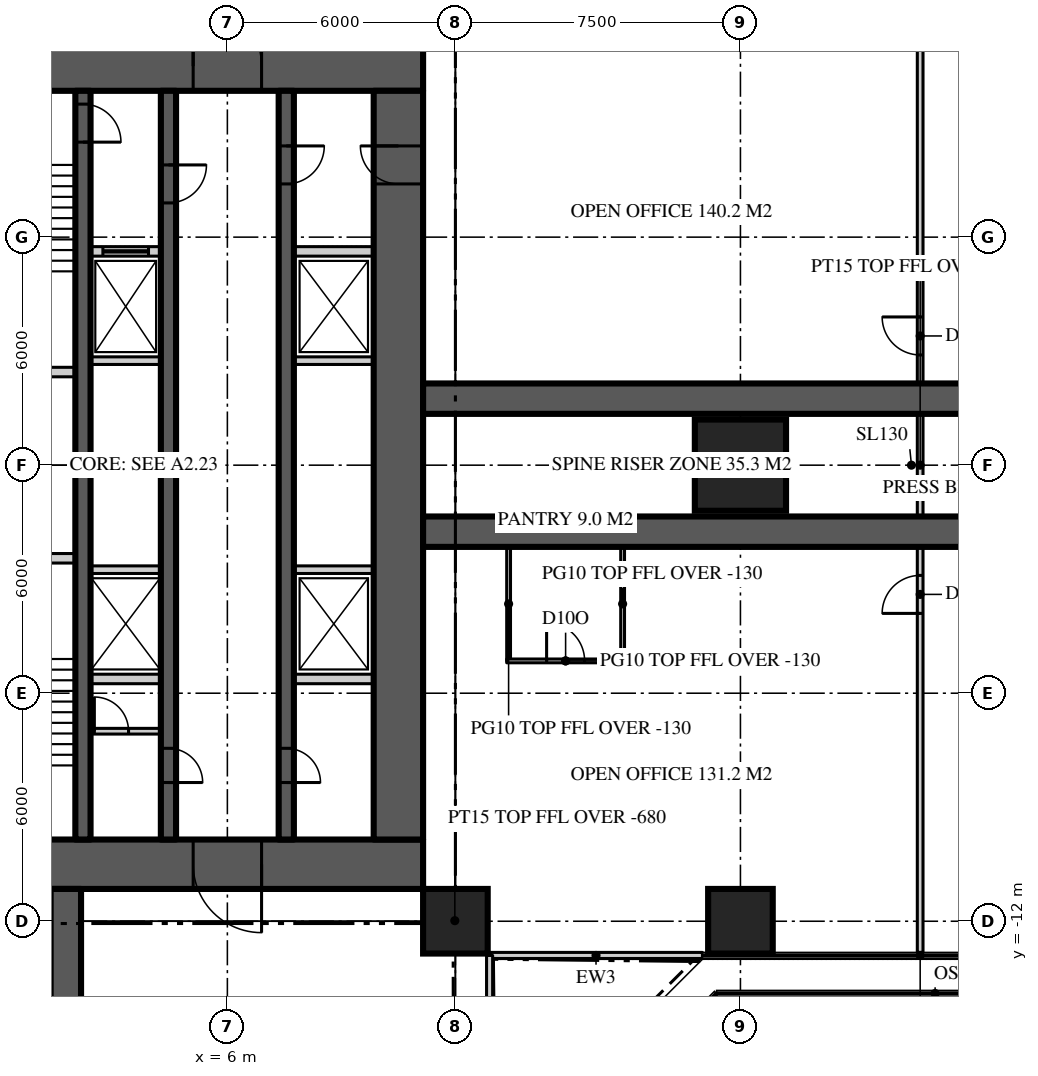
"""IFC4 building model, lengths in metres.
Left out: names, types, materials, properties, quantities, classifications, styles, units other than length and angle.
Written with IfcOpenShell. Run it as: python <this file> out.ifc"""

import sys

from ifc_helpers import new_model, si_unit, direction, frame, frame_2d, origin, origin_2d, place, context, subcontext, project, spatial, rectangle, extrude, element, fill, save


model = new_model("IFC4")
c1 = context("Model", 3, precision=1e-05, world=origin(), true_north=direction((0.0, 1.0)))
c2 = subcontext(c1, "Body", "Model", "MODEL_VIEW")
j1 = project(units=[si_unit("LENGTHUNIT", "METRE"), si_unit("PLANEANGLEUNIT", "RADIAN")], contexts=[c1])
p1 = place(None, origin())
s1 = spatial("IfcSite", under=j1, at=p1, CompositionType="ELEMENT")
p2 = place(p1, origin())
s2 = spatial("IfcBuilding", under=s1, at=p2, CompositionType="ELEMENT")
p3 = place(p2, frame((0.0, 0.0, 174.9)))
s3 = spatial("IfcBuildingStorey", under=s2, at=p3, CompositionType="ELEMENT", Elevation=174.9)
p4 = place(p3, frame((-11.15, 10.5, 0.0), z_axis=(0.0, 0.0, 1.0), x_axis=(1.0, 0.0, 0.0)))
e1 = element("IfcWall", 1, at=p4, inside=s3, PredefinedType="SHEAR", context=c2, shape_type="SweptSolid", body=[
    extrude(rectangle(XDim=22.3, YDim=1.3, at=frame_2d((11.15, 0.0))), origin(), (0.0, 0.0, 1.0), 3.9),
])
p5 = place(p4, frame((4.25, 0.0, 0.0)))
e2 = element("IfcOpeningElement", 2, at=p5, cuts=e1, PredefinedType="OPENING", context=c2, shape_type="SweptSolid", body=[
    extrude(rectangle(XDim=1.8, YDim=2.2, at=frame_2d((0.9, 1.1))), frame((0.0, 0.66, 0.0), z_axis=(0.0, -1.0, 0.0), x_axis=(1.0, 0.0, 0.0)), (0.0, 0.0, 1.0), 1.32),
])
p6 = place(p4, frame((16.25, 0.0, 0.0)))
e3 = element("IfcOpeningElement", 3, at=p6, cuts=e1, PredefinedType="OPENING", context=c2, shape_type="SweptSolid", body=[
    extrude(rectangle(XDim=1.8, YDim=2.2, at=frame_2d((0.9, 1.1))), frame((0.0, 0.66, 0.0), z_axis=(0.0, -1.0, 0.0), x_axis=(1.0, 0.0, 0.0)), (0.0, 0.0, 1.0), 1.32),
])
p7 = place(p3, frame((11.15, -10.5, 0.0), z_axis=(0.0, 0.0, 1.0), x_axis=(-1.0, 0.0, 0.0)))
e4 = element("IfcWall", 4, at=p7, inside=s3, PredefinedType="SHEAR", context=c2, shape_type="SweptSolid", body=[
    extrude(rectangle(XDim=22.3, YDim=1.3, at=frame_2d((11.15, 0.0))), origin(), (0.0, 0.0, 1.0), 3.9),
])
p8 = place(p7, frame((16.25, 0.0, 0.0)))
e5 = element("IfcOpeningElement", 5, at=p8, cuts=e4, PredefinedType="OPENING", context=c2, shape_type="SweptSolid", body=[
    extrude(rectangle(XDim=1.8, YDim=2.2, at=frame_2d((0.9, 1.1))), frame((0.0, 0.66, 0.0), z_axis=(0.0, -1.0, 0.0), x_axis=(1.0, 0.0, 0.0)), (0.0, 0.0, 1.0), 1.32),
])
p9 = place(p7, frame((4.25, 0.0, 0.0)))
e6 = element("IfcOpeningElement", 6, at=p9, cuts=e4, PredefinedType="OPENING", context=c2, shape_type="SweptSolid", body=[
    extrude(rectangle(XDim=1.8, YDim=2.2, at=frame_2d((0.9, 1.1))), frame((0.0, 0.66, 0.0), z_axis=(0.0, -1.0, 0.0), x_axis=(1.0, 0.0, 0.0)), (0.0, 0.0, 1.0), 1.32),
])
p10 = place(p3, frame((10.5, -9.85, 0.0), z_axis=(0.0, 0.0, 1.0), x_axis=(0.0, 1.0, 0.0)))
e7 = element("IfcWall", 7, at=p10, inside=s3, PredefinedType="SHEAR", context=c2, shape_type="SweptSolid", body=[
    extrude(rectangle(XDim=19.7, YDim=1.3, at=frame_2d((9.85, 0.0))), origin(), (0.0, 0.0, 1.0), 3.9),
])
p11 = place(p10, frame((17.25, 0.0, 0.0)))
e8 = element("IfcOpeningElement", 8, at=p11, cuts=e7, PredefinedType="OPENING", context=c2, shape_type="SweptSolid", body=[
    extrude(rectangle(XDim=1.0, YDim=2.2, at=frame_2d((0.5, 1.1))), frame((0.0, 0.66, 0.0), z_axis=(0.0, -1.0, 0.0), x_axis=(1.0, 0.0, 0.0)), (0.0, 0.0, 1.0), 1.32),
])
for number, where, z_axis, x_axis in (
    (9, (11.15, -1.75, 0.0), (0.0, 0.0, 1.0), (1.0, 0.0, 0.0)),
    (10, (11.15, 1.75, 0.0), (0.0, 0.0, 1.0), (1.0, 0.0, 0.0)),
    (11, (1.75, -11.15, 0.0), (0.0, 0.0, 1.0), (0.0, -1.0, 0.0)),
):
    element("IfcWall", number, at=place(p3, frame(where, z_axis=z_axis, x_axis=x_axis)), inside=s3, PredefinedType="SHEAR", context=c2, shape_type="SweptSolid", body=[
        extrude(rectangle(XDim=15.25, YDim=0.8, at=frame_2d((7.625, 0.0))), origin(), (0.0, 0.0, 1.0), 3.9),
    ])
for number, where, z_axis, x_axis in (
    (12, (12.0, -12.0, 0.0), (0.0, 0.0, 1.0), (1.0, 0.0, 0.0)),
    (13, (19.5, -12.0, 0.0), (0.0, 0.0, 1.0), (1.0, 0.0, 0.0)),
):
    element("IfcColumn", number, at=place(p3, frame(where, z_axis=z_axis, x_axis=x_axis)), inside=s3, PredefinedType="COLUMN", context=c2, shape_type="SweptSolid", body=[
        extrude(rectangle(XDim=1.7, YDim=1.7, at=origin_2d()), origin(), (0.0, 0.0, 1.0), 3.9),
    ])
p12 = place(p3, frame((19.5, 0.0, 0.0), z_axis=(0.0, 0.0, 1.0), x_axis=(1.0, 0.0, 0.0)))
e14 = element("IfcColumn", 14, at=p12, inside=s3, PredefinedType="COLUMN", context=c2, shape_type="SweptSolid", body=[
    extrude(rectangle(XDim=2.4, YDim=2.4, at=origin_2d()), origin(), (0.0, 0.0, 1.0), 3.9),
])
p13 = place(p3, frame((12.9, -12.9, 0.0), z_axis=(0.0, 0.0, 1.0), x_axis=(1.0, 0.0, 0.0)))
e15 = element("IfcWall", 15, at=p13, inside=s3, PredefinedType="SOLIDWALL", context=c2, shape_type="SweptSolid", body=[
    extrude(rectangle(XDim=5.6, YDim=0.16, at=frame_2d((2.8, 0.0))), origin(), (0.0, 0.0, 1.0), 3.77),
])
p14 = place(p3, frame((12.9, -18.5, 0.0), z_axis=(0.0, 0.0, 1.0), x_axis=(0.0, 1.0, 0.0)))
e16 = element("IfcWall", 16, at=p14, inside=s3, PredefinedType="SOLIDWALL", context=c2, shape_type="SweptSolid", body=[
    extrude(rectangle(XDim=5.6, YDim=0.16, at=frame_2d((2.8, 0.0))), origin(), (0.0, 0.0, 1.0), 3.77),
])
p15 = place(p14, frame((2.3, 0.0, 0.0)))
e17 = element("IfcOpeningElement", 17, at=p15, cuts=e16, PredefinedType="OPENING", context=c2, shape_type="SweptSolid", body=[
    extrude(rectangle(XDim=1.0, YDim=2.2, at=frame_2d((0.5, 1.1))), frame((0.0, 0.09, 0.0), z_axis=(0.0, -1.0, 0.0), x_axis=(1.0, 0.0, 0.0)), (0.0, 0.0, 1.0), 0.18),
])
p16 = place(p3, frame((7.55, 9.85, 0.0), z_axis=(0.0, 0.0, 1.0), x_axis=(0.0, -1.0, 0.0)))
e18 = element("IfcWall", 18, at=p16, inside=s3, PredefinedType="SHEAR", context=c2, shape_type="SweptSolid", body=[
    extrude(rectangle(XDim=19.7, YDim=0.4, at=frame_2d((9.85, 0.0))), origin(), (0.0, 0.0, 1.0), 3.9),
])
p17 = place(p16, frame((1.45, 0.0, 0.0)))
e19 = element("IfcOpeningElement", 19, at=p17, cuts=e18, PredefinedType="OPENING", context=c2, shape_type="SweptSolid", body=[
    extrude(rectangle(XDim=1.0, YDim=2.2, at=frame_2d((0.5, 1.1))), frame((0.0, 0.21, 0.0), z_axis=(0.0, -1.0, 0.0), x_axis=(1.0, 0.0, 0.0)), (0.0, 0.0, 1.0), 0.42),
])
p18 = place(p16, frame((17.3, 0.0, 0.0)))
e20 = element("IfcOpeningElement", 20, at=p18, cuts=e18, PredefinedType="OPENING", context=c2, shape_type="SweptSolid", body=[
    extrude(rectangle(XDim=0.9, YDim=2.1, at=frame_2d((0.45, 1.05))), frame((0.0, 0.21, 0.0), z_axis=(0.0, -1.0, 0.0), x_axis=(1.0, 0.0, 0.0)), (0.0, 0.0, 1.0), 0.42),
])
p19 = place(p3, frame((4.45, 9.85, 0.0), z_axis=(0.0, 0.0, 1.0), x_axis=(0.0, -1.0, 0.0)))
e21 = element("IfcWall", 21, at=p19, inside=s3, PredefinedType="SHEAR", context=c2, shape_type="SweptSolid", body=[
    extrude(rectangle(XDim=19.7, YDim=0.4, at=frame_2d((9.85, 0.0))), origin(), (0.0, 0.0, 1.0), 3.9),
])
p20 = place(p19, frame((1.95, 0.0, 0.0)))
e22 = element("IfcOpeningElement", 22, at=p20, cuts=e21, PredefinedType="OPENING", context=c2, shape_type="SweptSolid", body=[
    extrude(rectangle(XDim=1.0, YDim=2.2, at=frame_2d((0.5, 1.1))), frame((0.0, 0.21, 0.0), z_axis=(0.0, -1.0, 0.0), x_axis=(1.0, 0.0, 0.0)), (0.0, 0.0, 1.0), 0.42),
])
p21 = place(p19, frame((17.3, 0.0, 0.0)))
e23 = element("IfcOpeningElement", 23, at=p21, cuts=e21, PredefinedType="OPENING", context=c2, shape_type="SweptSolid", body=[
    extrude(rectangle(XDim=0.9, YDim=2.1, at=frame_2d((0.45, 1.05))), frame((0.0, 0.21, 0.0), z_axis=(0.0, -1.0, 0.0), x_axis=(1.0, 0.0, 0.0)), (0.0, 0.0, 1.0), 0.42),
])
p22 = place(p3, frame((2.2, 9.85, 0.0), z_axis=(0.0, 0.0, 1.0), x_axis=(0.0, -1.0, 0.0)))
e24 = element("IfcWall", 24, at=p22, inside=s3, PredefinedType="SHEAR", context=c2, shape_type="SweptSolid", body=[
    extrude(rectangle(XDim=19.7, YDim=0.4, at=frame_2d((9.85, 0.0))), origin(), (0.0, 0.0, 1.0), 3.9),
])
p23 = place(p22, frame((0.35, 0.0, 0.0)))
e25 = element("IfcOpeningElement", 25, at=p23, cuts=e24, PredefinedType="OPENING", context=c2, shape_type="SweptSolid", body=[
    extrude(rectangle(XDim=1.0, YDim=2.2, at=frame_2d((0.5, 1.1))), frame((0.0, 0.21, 0.0), z_axis=(0.0, -1.0, 0.0), x_axis=(1.0, 0.0, 0.0)), (0.0, 0.0, 1.0), 0.42),
])
p24 = place(p3, frame((2.4, 5.625, 0.0), z_axis=(0.0, 0.0, 1.0), x_axis=(1.0, 0.0, 0.0)))
e26 = element("IfcWall", 26, at=p24, inside=s3, PredefinedType="SOLIDWALL", context=c2, shape_type="SweptSolid", body=[
    extrude(rectangle(XDim=1.85, YDim=0.25, at=frame_2d((0.925, 0.0))), origin(), (0.0, 0.0, 1.0), 3.7),
])
p25 = place(p24, frame((0.325, 0.0, 0.0)))
e27 = element("IfcOpeningElement", 27, at=p25, cuts=e26, PredefinedType="OPENING", context=c2, shape_type="SweptSolid", body=[
    extrude(rectangle(XDim=1.2, YDim=2.2, at=frame_2d((0.6, 1.1))), frame((0.0, 0.135, 0.0), z_axis=(0.0, -1.0, 0.0), x_axis=(1.0, 0.0, 0.0)), (0.0, 0.0, 1.0), 0.27),
])
p26 = place(p3, frame((7.75, 5.625, 0.0), z_axis=(0.0, 0.0, 1.0), x_axis=(1.0, 0.0, 0.0)))
e28 = element("IfcWall", 28, at=p26, inside=s3, PredefinedType="SOLIDWALL", context=c2, shape_type="SweptSolid", body=[
    extrude(rectangle(XDim=2.1, YDim=0.25, at=frame_2d((1.05, 0.0))), origin(), (0.0, 0.0, 1.0), 3.7),
])
p27 = place(p3, frame((2.4, -5.625, 0.0), z_axis=(0.0, 0.0, 1.0), x_axis=(1.0, 0.0, 0.0)))
e29 = element("IfcWall", 29, at=p27, inside=s3, PredefinedType="SOLIDWALL", context=c2, shape_type="SweptSolid", body=[
    extrude(rectangle(XDim=1.85, YDim=0.25, at=frame_2d((0.925, 0.0))), origin(), (0.0, 0.0, 1.0), 3.7),
])
p28 = place(p3, frame((7.75, -5.625, 0.0), z_axis=(0.0, 0.0, 1.0), x_axis=(1.0, 0.0, 0.0)))
e30 = element("IfcWall", 30, at=p28, inside=s3, PredefinedType="SOLIDWALL", context=c2, shape_type="SweptSolid", body=[
    extrude(rectangle(XDim=2.1, YDim=0.25, at=frame_2d((1.05, 0.0))), origin(), (0.0, 0.0, 1.0), 3.7),
])
for number, where, z_axis, x_axis in (
    (31, (-2.0, -2.45, 0.0), (0.0, 0.0, 1.0), (1.0, 0.0, 0.0)),
    (32, (-2.0, 2.45, 0.0), (0.0, 0.0, 1.0), (1.0, 0.0, 0.0)),
):
    element("IfcWall", number, at=place(p3, frame(where, z_axis=z_axis, x_axis=x_axis)), inside=s3, PredefinedType="SOLIDWALL", context=c2, shape_type="SweptSolid", body=[
        extrude(rectangle(XDim=4.0, YDim=0.25, at=frame_2d((2.0, 0.0))), origin(), (0.0, 0.0, 1.0), 3.7),
    ])
p29 = place(p3, frame((2.4, -2.75, 0.0), z_axis=(0.0, 0.0, 1.0), x_axis=(1.0, 0.0, 0.0)))
e33 = element("IfcWall", 33, at=p29, inside=s3, PredefinedType="SOLIDWALL", context=c2, shape_type="SweptSolid", body=[
    extrude(rectangle(XDim=1.85, YDim=0.2, at=frame_2d((0.925, 0.0))), origin(), (0.0, 0.0, 1.0), 3.7),
])
p30 = place(p3, frame((7.75, -2.75, 0.0), z_axis=(0.0, 0.0, 1.0), x_axis=(1.0, 0.0, 0.0)))
e34 = element("IfcWall", 34, at=p30, inside=s3, PredefinedType="SOLIDWALL", context=c2, shape_type="SweptSolid", body=[
    extrude(rectangle(XDim=2.1, YDim=0.2, at=frame_2d((1.05, 0.0))), origin(), (0.0, 0.0, 1.0), 3.7),
])
p31 = place(p3, frame((2.4, 2.75, 0.0), z_axis=(0.0, 0.0, 1.0), x_axis=(1.0, 0.0, 0.0)))
e35 = element("IfcWall", 35, at=p31, inside=s3, PredefinedType="SOLIDWALL", context=c2, shape_type="SweptSolid", body=[
    extrude(rectangle(XDim=1.85, YDim=0.2, at=frame_2d((0.925, 0.0))), origin(), (0.0, 0.0, 1.0), 3.7),
])
p32 = place(p3, frame((7.75, 2.75, 0.0), z_axis=(0.0, 0.0, 1.0), x_axis=(1.0, 0.0, 0.0)))
e36 = element("IfcWall", 36, at=p32, inside=s3, PredefinedType="SOLIDWALL", context=c2, shape_type="SweptSolid", body=[
    extrude(rectangle(XDim=2.1, YDim=0.2, at=frame_2d((1.05, 0.0))), origin(), (0.0, 0.0, 1.0), 3.7),
])
p33 = place(p3, frame((24.229, -12.82, 0.0), z_axis=(0.0, 0.0, 1.0), x_axis=(0.0, 1.0, 0.0)))
e37 = element("IfcWall", 37, at=p33, inside=s3, PredefinedType="PARTITIONING", context=c2, shape_type="SweptSolid", body=[
    extrude(rectangle(XDim=25.64, YDim=0.15, at=frame_2d((12.82, 0.0))), origin(), (0.0, 0.0, 1.0), 3.77),
])
p34 = place(p33, frame((15.72, 0.0, 0.0)))
e38 = element("IfcOpeningElement", 38, at=p34, cuts=e37, PredefinedType="OPENING", context=c2, shape_type="SweptSolid", body=[
    extrude(rectangle(XDim=1.0, YDim=2.2, at=frame_2d((0.5, 1.1))), frame((0.0, 0.085, 0.0), z_axis=(0.0, -1.0, 0.0), x_axis=(1.0, 0.0, 0.0)), (0.0, 0.0, 1.0), 0.17),
])
p35 = place(p33, frame((8.92, 0.0, 0.0)))
e39 = element("IfcOpeningElement", 39, at=p35, cuts=e37, PredefinedType="OPENING", context=c2, shape_type="SweptSolid", body=[
    extrude(rectangle(XDim=1.0, YDim=2.2, at=frame_2d((0.5, 1.1))), frame((0.0, 0.085, 0.0), z_axis=(0.0, -1.0, 0.0), x_axis=(1.0, 0.0, 0.0)), (0.0, 0.0, 1.0), 0.17),
])
for number, where, z_axis, x_axis in (
    (40, (13.4, -2.15, 0.0), (0.0, 0.0, 1.0), (0.0, -1.0, 0.0)),
    (41, (16.4, -2.15, 0.0), (0.0, 0.0, 1.0), (0.0, -1.0, 0.0)),
):
    element("IfcWall", number, at=place(p3, frame(where, z_axis=z_axis, x_axis=x_axis)), inside=s3, PredefinedType="PARTITIONING", context=c2, shape_type="SweptSolid", body=[
        extrude(rectangle(XDim=3.0, YDim=0.1, at=frame_2d((1.5, 0.0))), origin(), (0.0, 0.0, 1.0), 3.77),
    ])
p36 = place(p3, frame((13.35, -5.15, 0.0), z_axis=(0.0, 0.0, 1.0), x_axis=(1.0, 0.0, 0.0)))
e42 = element("IfcWall", 42, at=p36, inside=s3, PredefinedType="PARTITIONING", context=c2, shape_type="SweptSolid", body=[
    extrude(rectangle(XDim=3.1, YDim=0.1, at=frame_2d((1.55, 0.0))), origin(), (0.0, 0.0, 1.0), 3.77),
])
p37 = place(p36, frame((1.05, 0.0, 0.0)))
e43 = element("IfcOpeningElement", 43, at=p37, cuts=e42, PredefinedType="OPENING", context=c2, shape_type="SweptSolid", body=[
    extrude(rectangle(XDim=1.0, YDim=2.2, at=frame_2d((0.5, 1.1))), frame((0.0, 0.06, 0.0), z_axis=(0.0, -1.0, 0.0), x_axis=(1.0, 0.0, 0.0)), (0.0, 0.0, 1.0), 0.12),
])
p38 = place(p3, frame((11.15, -11.15, 0.0), z_axis=(0.0, 0.0, 1.0), x_axis=(0.707106781187, -0.707106781187, 0.0)))
e44 = element("IfcWall", 44, at=p38, inside=s3, PredefinedType="PARTITIONING", context=c2, shape_type="SweptSolid", body=[
    extrude(rectangle(XDim=2.362, YDim=0.15, at=frame_2d((1.181, 0.0))), origin(), (0.0, 0.0, 1.0), 3.22),
])
p39 = place(p3, frame((2.4, -7.0, 0.0), z_axis=(0.0, 0.0, 1.0), x_axis=(1.0, 0.0, 0.0)))
e45 = element("IfcWall", 45, at=p39, inside=s3, PredefinedType="SOLIDWALL", context=c2, shape_type="SweptSolid", body=[
    extrude(rectangle(XDim=1.85, YDim=0.15, at=frame_2d((0.925, 0.0))), origin(), (0.0, 0.0, 1.0), 3.77),
])
p40 = place(p39, frame((0.1, 0.0, 0.0)))
e46 = element("IfcOpeningElement", 46, at=p40, cuts=e45, PredefinedType="OPENING", context=c2, shape_type="SweptSolid", body=[
    extrude(rectangle(XDim=0.9, YDim=2.1, at=frame_2d((0.45, 1.05))), frame((0.0, 0.085, 0.0), z_axis=(0.0, -1.0, 0.0), x_axis=(1.0, 0.0, 0.0)), (0.0, 0.0, 1.0), 0.17),
])
p41 = place(p6, origin())
e47 = element("IfcDoor", 47, at=p41, inside=s3, OperationType="DOUBLE_DOOR_DOUBLE_SWING", PredefinedType="DOOR", context=c2, shape_type="SweptSolid", body=[
    extrude(rectangle(XDim=1.8, YDim=2.2, at=frame_2d((0.9, 1.1))), frame((0.0, 0.025, 0.0), z_axis=(0.0, -1.0, 0.0), x_axis=(1.0, 0.0, 0.0)), (0.0, 0.0, 1.0), 0.05),
])
fill(e3, e47)
p42 = place(p9, origin())
e48 = element("IfcDoor", 48, at=p42, inside=s3, OperationType="DOUBLE_DOOR_DOUBLE_SWING", PredefinedType="DOOR", context=c2, shape_type="SweptSolid", body=[
    extrude(rectangle(XDim=1.8, YDim=2.2, at=frame_2d((0.9, 1.1))), frame((0.0, 0.025, 0.0), z_axis=(0.0, -1.0, 0.0), x_axis=(1.0, 0.0, 0.0)), (0.0, 0.0, 1.0), 0.05),
])
fill(e6, e48)
p43 = place(p17, origin())
e49 = element("IfcDoor", 49, at=p43, inside=s3, OperationType="SINGLE_SWING_LEFT", PredefinedType="DOOR", context=c2, shape_type="SweptSolid", body=[
    extrude(rectangle(XDim=1.0, YDim=2.2, at=frame_2d((0.5, 1.1))), frame((0.0, 0.025, 0.0), z_axis=(0.0, -1.0, 0.0), x_axis=(1.0, 0.0, 0.0)), (0.0, 0.0, 1.0), 0.05),
])
fill(e19, e49)
p44 = place(p11, origin())
e50 = element("IfcDoor", 50, at=p44, inside=s3, OperationType="SINGLE_SWING_RIGHT", PredefinedType="DOOR", context=c2, shape_type="SweptSolid", body=[
    extrude(rectangle(XDim=1.0, YDim=2.2, at=frame_2d((0.5, 1.1))), frame((0.0, 0.025, 0.0), z_axis=(0.0, -1.0, 0.0), x_axis=(1.0, 0.0, 0.0)), (0.0, 0.0, 1.0), 0.05),
])
fill(e8, e50)
p45 = place(p20, origin())
e51 = element("IfcDoor", 51, at=p45, inside=s3, OperationType="SINGLE_SWING_LEFT", PredefinedType="DOOR", context=c2, shape_type="SweptSolid", body=[
    extrude(rectangle(XDim=1.0, YDim=2.2, at=frame_2d((0.5, 1.1))), frame((0.0, 0.025, 0.0), z_axis=(0.0, -1.0, 0.0), x_axis=(1.0, 0.0, 0.0)), (0.0, 0.0, 1.0), 0.05),
])
fill(e22, e51)
p46 = place(p23, origin())
e52 = element("IfcDoor", 52, at=p46, inside=s3, OperationType="SINGLE_SWING_RIGHT", PredefinedType="DOOR", context=c2, shape_type="SweptSolid", body=[
    extrude(rectangle(XDim=1.0, YDim=2.2, at=frame_2d((0.5, 1.1))), frame((0.0, 0.025, 0.0), z_axis=(0.0, -1.0, 0.0), x_axis=(1.0, 0.0, 0.0)), (0.0, 0.0, 1.0), 0.05),
])
fill(e25, e52)
p47 = place(p18, origin())
e53 = element("IfcDoor", 53, at=p47, inside=s3, OperationType="SINGLE_SWING_RIGHT", PredefinedType="DOOR", context=c2, shape_type="SweptSolid", body=[
    extrude(rectangle(XDim=0.9, YDim=2.1, at=frame_2d((0.45, 1.05))), frame((0.0, 0.025, 0.0), z_axis=(0.0, -1.0, 0.0), x_axis=(1.0, 0.0, 0.0)), (0.0, 0.0, 1.0), 0.05),
])
fill(e20, e53)
p48 = place(p21, origin())
e54 = element("IfcDoor", 54, at=p48, inside=s3, OperationType="SINGLE_SWING_RIGHT", PredefinedType="DOOR", context=c2, shape_type="SweptSolid", body=[
    extrude(rectangle(XDim=0.9, YDim=2.1, at=frame_2d((0.45, 1.05))), frame((0.0, 0.025, 0.0), z_axis=(0.0, -1.0, 0.0), x_axis=(1.0, 0.0, 0.0)), (0.0, 0.0, 1.0), 0.05),
])
fill(e23, e54)
p49 = place(p25, origin())
e55 = element("IfcDoor", 55, at=p49, inside=s3, OperationType="SLIDING_TO_LEFT", PredefinedType="DOOR", context=c2, shape_type="SweptSolid", body=[
    extrude(rectangle(XDim=1.2, YDim=2.2, at=frame_2d((0.6, 1.1))), frame((0.0, 0.025, 0.0), z_axis=(0.0, -1.0, 0.0), x_axis=(1.0, 0.0, 0.0)), (0.0, 0.0, 1.0), 0.05),
])
fill(e27, e55)
p50 = place(p34, origin())
e56 = element("IfcDoor", 56, at=p50, inside=s3, OperationType="SINGLE_SWING_RIGHT", PredefinedType="DOOR", context=c2, shape_type="SweptSolid", body=[
    extrude(rectangle(XDim=1.0, YDim=2.2, at=frame_2d((0.5, 1.1))), frame((0.0, 0.025, 0.0), z_axis=(0.0, -1.0, 0.0), x_axis=(1.0, 0.0, 0.0)), (0.0, 0.0, 1.0), 0.05),
])
fill(e38, e56)
p51 = place(p35, origin())
e57 = element("IfcDoor", 57, at=p51, inside=s3, OperationType="SINGLE_SWING_LEFT", PredefinedType="DOOR", context=c2, shape_type="SweptSolid", body=[
    extrude(rectangle(XDim=1.0, YDim=2.2, at=frame_2d((0.5, 1.1))), frame((0.0, 0.025, 0.0), z_axis=(0.0, -1.0, 0.0), x_axis=(1.0, 0.0, 0.0)), (0.0, 0.0, 1.0), 0.05),
])
fill(e39, e57)
p52 = place(p37, origin())
e58 = element("IfcDoor", 58, at=p52, inside=s3, OperationType="SINGLE_SWING_LEFT", PredefinedType="DOOR", context=c2, shape_type="SweptSolid", body=[
    extrude(rectangle(XDim=1.0, YDim=2.2, at=frame_2d((0.5, 1.1))), frame((0.0, 0.025, 0.0), z_axis=(0.0, -1.0, 0.0), x_axis=(1.0, 0.0, 0.0)), (0.0, 0.0, 1.0), 0.05),
])
fill(e43, e58)
p53 = place(p40, origin())
e59 = element("IfcDoor", 59, at=p53, inside=s3, OperationType="SINGLE_SWING_LEFT", PredefinedType="DOOR", context=c2, shape_type="SweptSolid", body=[
    extrude(rectangle(XDim=0.9, YDim=2.1, at=frame_2d((0.45, 1.05))), frame((0.0, 0.025, 0.0), z_axis=(0.0, -1.0, 0.0), x_axis=(1.0, 0.0, 0.0)), (0.0, 0.0, 1.0), 0.05),
])
fill(e46, e59)
save(model, sys.argv[1])
